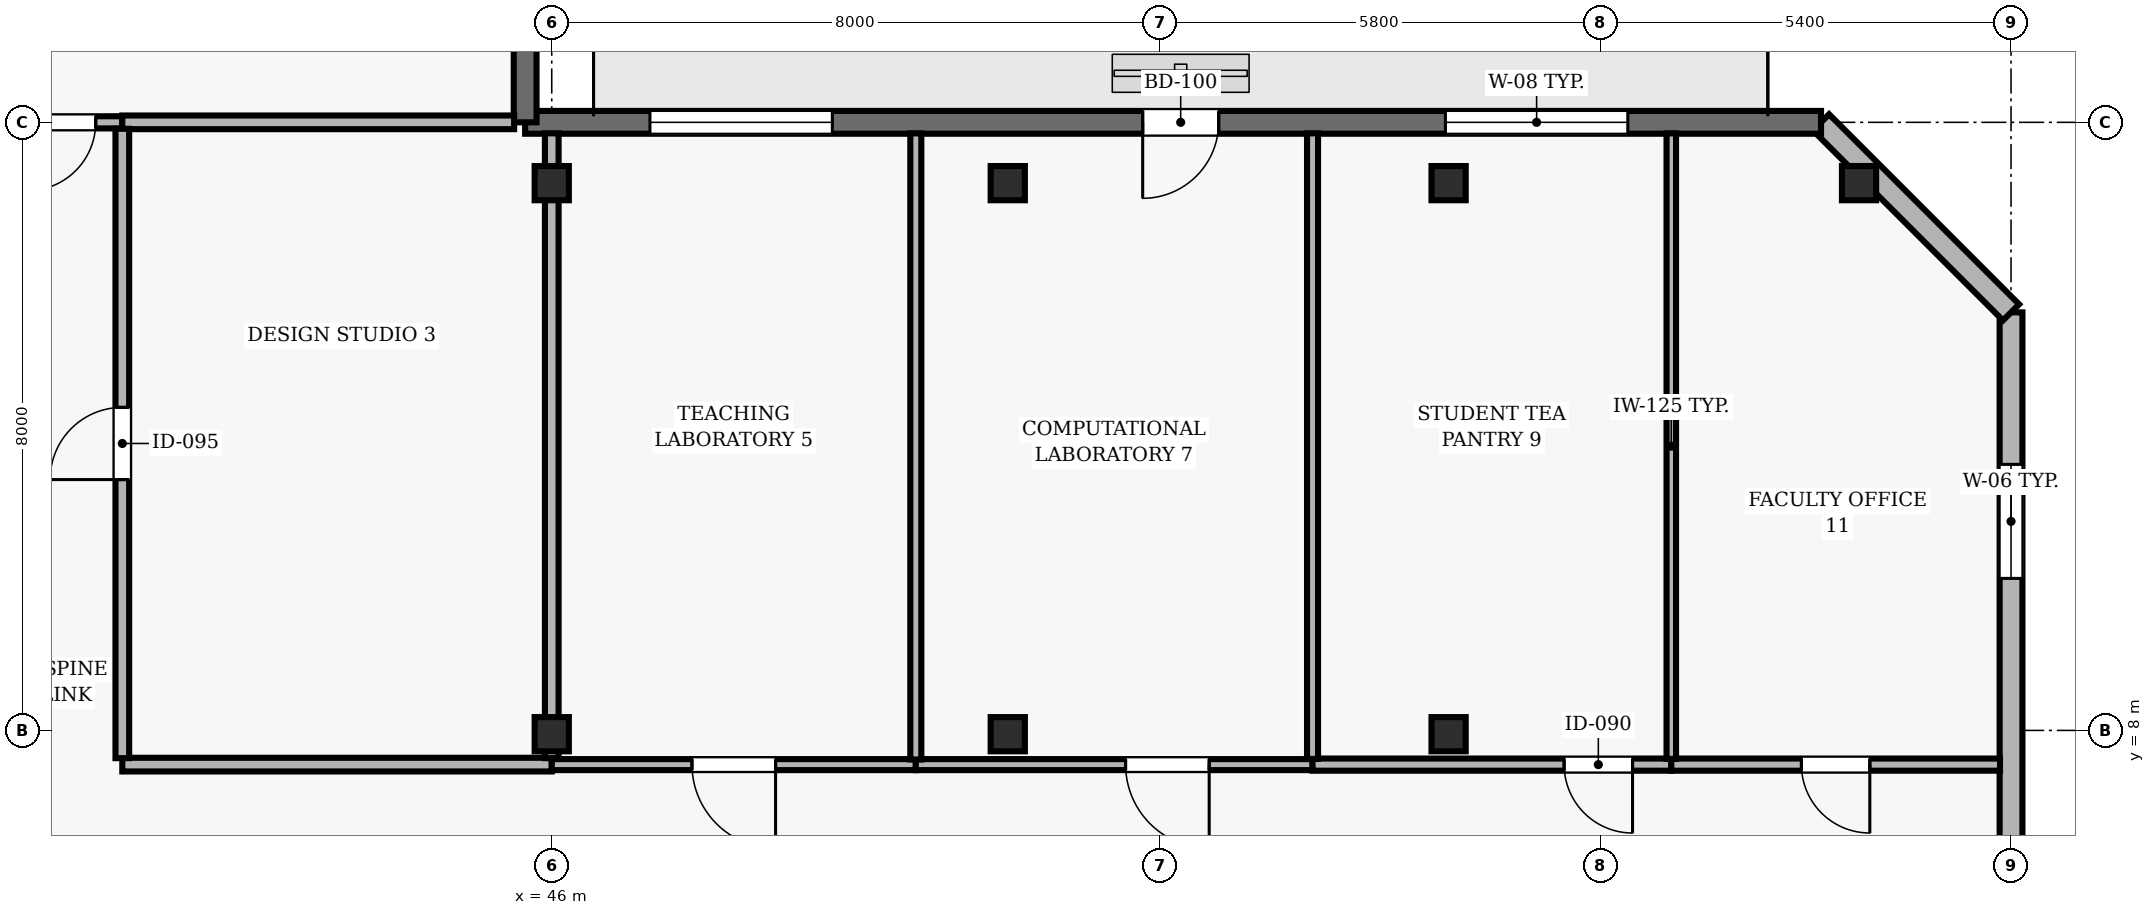
"""IFC4 building model, lengths in metres.
Left out: names, types, materials, properties, quantities, classifications, styles, units other than length and angle.
Written with IfcOpenShell. Run it as: python <this file> out.ifc"""

import sys

from ifc_helpers import new_model, si_unit, direction, frame, frame_2d, origin, origin_2d, place, context, subcontext, project, spatial, rectangle, hollow_rectangle, extrude, element, fill, save


model = new_model("IFC4")
c1 = context("Model", 3, precision=1e-05, world=origin(), true_north=direction((0.0, 1.0)))
c2 = subcontext(c1, "Body", "Model", "MODEL_VIEW")
j1 = project(units=[si_unit("LENGTHUNIT", "METRE"), si_unit("PLANEANGLEUNIT", "RADIAN")], contexts=[c1])
p1 = place(None, origin())
s1 = spatial("IfcSite", under=j1, at=p1, CompositionType="ELEMENT")
p2 = place(p1, origin())
s2 = spatial("IfcBuilding", under=s1, at=p2, CompositionType="ELEMENT")
p3 = place(p2, frame((0.0, 0.0, 210.9)))
s3 = spatial("IfcBuildingStorey", under=s2, at=p3, CompositionType="ELEMENT", Elevation=210.9)
for number, where, z_axis, x_axis in (
    (1, (46.0, 7.95, 0.0), (0.0, 0.0, 1.0), (1.0, 0.0, 0.0)),
    (2, (46.0, 15.2, 0.0), (0.0, 0.0, 1.0), (1.0, 0.0, 0.0)),
    (3, (52.0, 7.95, 0.0), (0.0, 0.0, 1.0), (1.0, 0.0, 0.0)),
    (4, (52.0, 15.2, 0.0), (0.0, 0.0, 1.0), (1.0, 0.0, 0.0)),
    (5, (57.8, 7.95, 0.0), (0.0, 0.0, 1.0), (1.0, 0.0, 0.0)),
    (6, (57.8, 15.2, 0.0), (0.0, 0.0, 1.0), (1.0, 0.0, 0.0)),
    (7, (63.2, 15.2, 0.0), (0.0, 0.0, 1.0), (1.0, 0.0, 0.0)),
):
    element("IfcColumn", number, at=place(p3, frame(where, z_axis=z_axis, x_axis=x_axis)), inside=s3, PredefinedType="COLUMN", context=c2, shape_type="SweptSolid", body=[
        extrude(hollow_rectangle(XDim=0.45, YDim=0.45, WallThickness=0.02, at=origin_2d()), origin(), (0.0, 0.0, 1.0), 3.9),
    ])
p4 = place(p3, frame((65.2, 2.5, 0.0), z_axis=(0.0, 0.0, 1.0), x_axis=(0.0, 1.0, 0.0)))
e8 = element("IfcWall", 8, at=p4, inside=s3, PredefinedType="SOLIDWALL", context=c2, shape_type="SweptSolid", body=[
    extrude(rectangle(XDim=11.0, YDim=0.3, at=frame_2d((5.5, 0.0))), origin(), (0.0, 0.0, 1.0), 3.69),
])
p5 = place(p4, frame((7.5, 0.0, 0.9)))
e9 = element("IfcOpeningElement", 9, at=p5, cuts=e8, PredefinedType="OPENING", context=c2, shape_type="SweptSolid", body=[
    extrude(rectangle(XDim=1.5, YDim=1.8, at=frame_2d((0.75, 0.9))), frame((0.0, 0.16, 0.0), z_axis=(0.0, -1.0, 0.0), x_axis=(1.0, 0.0, 0.0)), (0.0, 0.0, 1.0), 0.32),
])
p6 = place(p3, frame((65.2, 13.5, 0.0), z_axis=(0.0, 0.0, 1.0), x_axis=(-0.707106781187, 0.707106781187, 0.0)))
e10 = element("IfcWall", 10, at=p6, inside=s3, PredefinedType="SOLIDWALL", context=c2, shape_type="SweptSolid", body=[
    extrude(rectangle(XDim=3.536, YDim=0.3, at=frame_2d((1.768, 0.0))), origin(), (0.0, 0.0, 1.0), 3.69),
])
p7 = place(p3, frame((62.7, 16.0, 0.0), z_axis=(0.0, 0.0, 1.0), x_axis=(-1.0, 0.0, 0.0)))
e11 = element("IfcWall", 11, at=p7, inside=s3, PredefinedType="SOLIDWALL", context=c2, shape_type="SweptSolid", body=[
    extrude(rectangle(XDim=17.05, YDim=0.3, at=frame_2d((8.525, 0.0))), origin(), (0.0, 0.0, 1.0), 3.69),
])
p8 = place(p7, frame((7.925, 0.0, 0.0)))
e12 = element("IfcOpeningElement", 12, at=p8, cuts=e11, PredefinedType="OPENING", context=c2, shape_type="SweptSolid", body=[
    extrude(rectangle(XDim=1.0, YDim=2.2, at=frame_2d((0.5, 1.1))), frame((0.0, 0.16, 0.0), z_axis=(0.0, -1.0, 0.0), x_axis=(1.0, 0.0, 0.0)), (0.0, 0.0, 1.0), 0.32),
])
p9 = place(p7, frame((2.542, 0.0, 0.9)))
e13 = element("IfcOpeningElement", 13, at=p9, cuts=e11, PredefinedType="OPENING", context=c2, shape_type="SweptSolid", body=[
    extrude(rectangle(XDim=2.4, YDim=1.8, at=frame_2d((1.2, 0.9))), frame((0.0, 0.16, 0.0), z_axis=(0.0, -1.0, 0.0), x_axis=(1.0, 0.0, 0.0)), (0.0, 0.0, 1.0), 0.32),
])
p10 = place(p7, frame((13.008, 0.0, 0.9)))
e14 = element("IfcOpeningElement", 14, at=p10, cuts=e11, PredefinedType="OPENING", context=c2, shape_type="SweptSolid", body=[
    extrude(rectangle(XDim=2.4, YDim=1.8, at=frame_2d((1.2, 0.9))), frame((0.0, 0.16, 0.0), z_axis=(0.0, -1.0, 0.0), x_axis=(1.0, 0.0, 0.0)), (0.0, 0.0, 1.0), 0.32),
])
p11 = place(p3, frame((45.65, 16.0, 0.0), z_axis=(0.0, 0.0, 1.0), x_axis=(0.0, 1.0, 0.0)))
e15 = element("IfcWall", 15, at=p11, inside=s3, PredefinedType="SOLIDWALL", context=c2, shape_type="SweptSolid", body=[
    extrude(rectangle(XDim=5.483, YDim=0.3, at=frame_2d((2.741, 0.0))), origin(), (0.0, 0.0, 1.0), 3.69),
])
p12 = place(p11, frame((1.342, 0.0, 0.9)))
e16 = element("IfcOpeningElement", 16, at=p12, cuts=e15, PredefinedType="OPENING", context=c2, shape_type="SweptSolid", body=[
    extrude(rectangle(XDim=2.8, YDim=1.8, at=frame_2d((1.4, 0.9))), frame((0.0, 0.16, 0.0), z_axis=(0.0, -1.0, 0.0), x_axis=(1.0, 0.0, 0.0)), (0.0, 0.0, 1.0), 0.32),
])
p13 = place(p3, frame((40.35, 16.0, 0.0), z_axis=(0.0, 0.0, 1.0), x_axis=(-1.0, 0.0, 0.0)))
e17 = element("IfcWall", 17, at=p13, inside=s3, PredefinedType="PARTITIONING", context=c2, shape_type="SweptSolid", body=[
    extrude(rectangle(XDim=2.3, YDim=0.16, at=frame_2d((1.15, 0.0))), origin(), (0.0, 0.0, 1.0), 3.39),
])
p14 = place(p13, frame((0.35, 0.0, 0.0)))
e18 = element("IfcOpeningElement", 18, at=p14, cuts=e17, PredefinedType="OPENING", context=c2, shape_type="SweptSolid", body=[
    extrude(rectangle(XDim=0.9, YDim=2.1, at=frame_2d((0.45, 1.05))), frame((0.0, 0.09, 0.0), z_axis=(0.0, -1.0, 0.0), x_axis=(1.0, 0.0, 0.0)), (0.0, 0.0, 1.0), 0.18),
])
p15 = place(p3, frame((40.35, 16.0, 0.0), z_axis=(0.0, 0.0, 1.0), x_axis=(1.0, 0.0, 0.0)))
e19 = element("IfcWall", 19, at=p15, inside=s3, PredefinedType="PARTITIONING", context=c2, shape_type="SweptSolid", body=[
    extrude(rectangle(XDim=5.155, YDim=0.18, at=frame_2d((2.577, 0.0))), origin(), (0.0, 0.0, 1.0), 3.39),
])
p16 = place(p3, frame((46.0, 7.55, 0.0), z_axis=(0.0, 0.0, 1.0), x_axis=(-1.0, 0.0, 0.0)))
e20 = element("IfcWall", 20, at=p16, inside=s3, PredefinedType="PARTITIONING", context=c2, shape_type="SweptSolid", body=[
    extrude(rectangle(XDim=5.65, YDim=0.18, at=frame_2d((2.825, 0.0))), origin(), (0.0, 0.0, 1.0), 3.146),
])
p17 = place(p3, frame((50.79, 7.55, 0.0), z_axis=(0.0, 0.0, 1.0), x_axis=(-1.0, 0.0, 0.0)))
e21 = element("IfcWall", 21, at=p17, inside=s3, PredefinedType="PARTITIONING", context=c2, shape_type="SweptSolid", body=[
    extrude(rectangle(XDim=4.79, YDim=0.145, at=frame_2d((2.395, 0.0))), origin(), (0.0, 0.0, 1.0), 3.146),
])
p18 = place(p17, frame((1.845, 0.0, 0.0)))
e22 = element("IfcOpeningElement", 22, at=p18, cuts=e21, PredefinedType="OPENING", context=c2, shape_type="SweptSolid", body=[
    extrude(rectangle(XDim=1.1, YDim=2.15, at=frame_2d((0.55, 1.075))), frame((0.0, 0.083, 0.0), z_axis=(0.0, -1.0, 0.0), x_axis=(1.0, 0.0, 0.0)), (0.0, 0.0, 1.0), 0.165),
])
p19 = place(p3, frame((56.01, 7.55, 0.0), z_axis=(0.0, 0.0, 1.0), x_axis=(-1.0, 0.0, 0.0)))
e23 = element("IfcWall", 23, at=p19, inside=s3, PredefinedType="PARTITIONING", context=c2, shape_type="SweptSolid", body=[
    extrude(rectangle(XDim=5.22, YDim=0.145, at=frame_2d((2.61, 0.0))), origin(), (0.0, 0.0, 1.0), 3.146),
])
p20 = place(p19, frame((1.36, 0.0, 0.0)))
e24 = element("IfcOpeningElement", 24, at=p20, cuts=e23, PredefinedType="OPENING", context=c2, shape_type="SweptSolid", body=[
    extrude(rectangle(XDim=1.1, YDim=2.15, at=frame_2d((0.55, 1.075))), frame((0.0, 0.083, 0.0), z_axis=(0.0, -1.0, 0.0), x_axis=(1.0, 0.0, 0.0)), (0.0, 0.0, 1.0), 0.165),
])
p21 = place(p3, frame((60.73, 7.55, 0.0), z_axis=(0.0, 0.0, 1.0), x_axis=(-1.0, 0.0, 0.0)))
e25 = element("IfcWall", 25, at=p21, inside=s3, PredefinedType="PARTITIONING", context=c2, shape_type="SweptSolid", body=[
    extrude(rectangle(XDim=4.72, YDim=0.16, at=frame_2d((2.36, 0.0))), origin(), (0.0, 0.0, 1.0), 3.146),
])
p22 = place(p21, frame((0.51, 0.0, 0.0)))
e26 = element("IfcOpeningElement", 26, at=p22, cuts=e25, PredefinedType="OPENING", context=c2, shape_type="SweptSolid", body=[
    extrude(rectangle(XDim=0.9, YDim=2.1, at=frame_2d((0.45, 1.05))), frame((0.0, 0.09, 0.0), z_axis=(0.0, -1.0, 0.0), x_axis=(1.0, 0.0, 0.0)), (0.0, 0.0, 1.0), 0.18),
])
p23 = place(p3, frame((65.055, 7.55, 0.0), z_axis=(0.0, 0.0, 1.0), x_axis=(-1.0, 0.0, 0.0)))
e27 = element("IfcWall", 27, at=p23, inside=s3, PredefinedType="PARTITIONING", context=c2, shape_type="SweptSolid", body=[
    extrude(rectangle(XDim=4.325, YDim=0.16, at=frame_2d((2.163, 0.0))), origin(), (0.0, 0.0, 1.0), 3.69),
])
p24 = place(p23, frame((1.713, 0.0, 0.0)))
e28 = element("IfcOpeningElement", 28, at=p24, cuts=e27, PredefinedType="OPENING", context=c2, shape_type="SweptSolid", body=[
    extrude(rectangle(XDim=0.9, YDim=2.1, at=frame_2d((0.45, 1.05))), frame((0.0, 0.09, 0.0), z_axis=(0.0, -1.0, 0.0), x_axis=(1.0, 0.0, 0.0)), (0.0, 0.0, 1.0), 0.18),
])
p25 = place(p3, frame((40.35, 7.635, 0.0), z_axis=(0.0, 0.0, 1.0), x_axis=(0.0, 1.0, 0.0)))
e29 = element("IfcWall", 29, at=p25, inside=s3, PredefinedType="PARTITIONING", context=c2, shape_type="SweptSolid", body=[
    extrude(rectangle(XDim=8.28, YDim=0.18, at=frame_2d((4.14, 0.0))), origin(), (0.0, 0.0, 1.0), 3.372),
])
p26 = place(p25, frame((3.665, 0.0, 0.0)))
e30 = element("IfcOpeningElement", 30, at=p26, cuts=e29, PredefinedType="OPENING", context=c2, shape_type="SweptSolid", body=[
    extrude(rectangle(XDim=0.95, YDim=2.1, at=frame_2d((0.475, 1.05))), frame((0.0, 0.1, 0.0), z_axis=(0.0, -1.0, 0.0), x_axis=(1.0, 0.0, 0.0)), (0.0, 0.0, 1.0), 0.2),
])
p27 = place(p3, frame((46.0, 7.635, 0.0), z_axis=(0.0, 0.0, 1.0), x_axis=(0.0, 1.0, 0.0)))
e31 = element("IfcWall", 31, at=p27, inside=s3, PredefinedType="PARTITIONING", context=c2, shape_type="SweptSolid", body=[
    extrude(rectangle(XDim=8.22, YDim=0.18, at=frame_2d((4.11, 0.0))), origin(), (0.0, 0.0, 1.0), 3.146),
])
p28 = place(p3, frame((50.79, 7.617, 0.0), z_axis=(0.0, 0.0, 1.0), x_axis=(0.0, 1.0, 0.0)))
e32 = element("IfcWall", 32, at=p28, inside=s3, PredefinedType="PARTITIONING", context=c2, shape_type="SweptSolid", body=[
    extrude(rectangle(XDim=8.238, YDim=0.145, at=frame_2d((4.119, 0.0))), origin(), (0.0, 0.0, 1.0), 3.69),
])
p29 = place(p3, frame((56.01, 7.625, 0.0), z_axis=(0.0, 0.0, 1.0), x_axis=(0.0, 1.0, 0.0)))
e33 = element("IfcWall", 33, at=p29, inside=s3, PredefinedType="PARTITIONING", context=c2, shape_type="SweptSolid", body=[
    extrude(rectangle(XDim=8.23, YDim=0.145, at=frame_2d((4.115, 0.0))), origin(), (0.0, 0.0, 1.0), 3.69),
])
p30 = place(p3, frame((60.73, 7.625, 0.0), z_axis=(0.0, 0.0, 1.0), x_axis=(0.0, 1.0, 0.0)))
e34 = element("IfcWall", 34, at=p30, inside=s3, PredefinedType="PARTITIONING", context=c2, shape_type="SweptSolid", body=[
    extrude(rectangle(XDim=8.23, YDim=0.125, at=frame_2d((4.115, 0.0))), origin(), (0.0, 0.0, 1.0), 3.69),
])
p31 = place(p5, origin())
e35 = element("IfcWindow", 35, at=p31, inside=s3, PartitioningType="SINGLE_PANEL", PredefinedType="WINDOW", context=c2, shape_type="SweptSolid", body=[
    extrude(rectangle(XDim=1.5, YDim=1.8, at=frame_2d((0.75, 0.9))), frame((0.0, 0.03, 0.0), z_axis=(0.0, -1.0, 0.0), x_axis=(1.0, 0.0, 0.0)), (0.0, 0.0, 1.0), 0.06),
])
fill(e9, e35)
p32 = place(p8, origin())
e36 = element("IfcDoor", 36, at=p32, inside=s3, OperationType="SINGLE_SWING_RIGHT", PredefinedType="DOOR", context=c2, shape_type="SweptSolid", body=[
    extrude(rectangle(XDim=1.0, YDim=2.2, at=frame_2d((0.5, 1.1))), frame((0.0, 0.025, 0.0), z_axis=(0.0, -1.0, 0.0), x_axis=(1.0, 0.0, 0.0)), (0.0, 0.0, 1.0), 0.05),
])
fill(e12, e36)
p33 = place(p9, origin())
e37 = element("IfcWindow", 37, at=p33, inside=s3, PartitioningType="SINGLE_PANEL", PredefinedType="WINDOW", context=c2, shape_type="SweptSolid", body=[
    extrude(rectangle(XDim=2.4, YDim=1.8, at=frame_2d((1.2, 0.9))), frame((0.0, 0.03, 0.0), z_axis=(0.0, -1.0, 0.0), x_axis=(1.0, 0.0, 0.0)), (0.0, 0.0, 1.0), 0.06),
])
fill(e13, e37)
p34 = place(p10, origin())
e38 = element("IfcWindow", 38, at=p34, inside=s3, PartitioningType="SINGLE_PANEL", PredefinedType="WINDOW", context=c2, shape_type="SweptSolid", body=[
    extrude(rectangle(XDim=2.4, YDim=1.8, at=frame_2d((1.2, 0.9))), frame((0.0, 0.03, 0.0), z_axis=(0.0, -1.0, 0.0), x_axis=(1.0, 0.0, 0.0)), (0.0, 0.0, 1.0), 0.06),
])
fill(e14, e38)
p35 = place(p26, origin())
e39 = element("IfcDoor", 39, at=p35, inside=s3, OperationType="SINGLE_SWING_LEFT", PredefinedType="DOOR", context=c2, shape_type="SweptSolid", body=[
    extrude(rectangle(XDim=0.95, YDim=2.1, at=frame_2d((0.475, 1.05))), frame((0.0, 0.025, 0.0), z_axis=(0.0, -1.0, 0.0), x_axis=(1.0, 0.0, 0.0)), (0.0, 0.0, 1.0), 0.05),
])
fill(e30, e39)
p36 = place(p18, origin())
e40 = element("IfcDoor", 40, at=p36, inside=s3, OperationType="SINGLE_SWING_LEFT", PredefinedType="DOOR", context=c2, shape_type="SweptSolid", body=[
    extrude(rectangle(XDim=1.1, YDim=2.15, at=frame_2d((0.55, 1.075))), frame((0.0, 0.025, 0.0), z_axis=(0.0, -1.0, 0.0), x_axis=(1.0, 0.0, 0.0)), (0.0, 0.0, 1.0), 0.05),
])
fill(e22, e40)
p37 = place(p20, origin())
e41 = element("IfcDoor", 41, at=p37, inside=s3, OperationType="SINGLE_SWING_LEFT", PredefinedType="DOOR", context=c2, shape_type="SweptSolid", body=[
    extrude(rectangle(XDim=1.1, YDim=2.15, at=frame_2d((0.55, 1.075))), frame((0.0, 0.025, 0.0), z_axis=(0.0, -1.0, 0.0), x_axis=(1.0, 0.0, 0.0)), (0.0, 0.0, 1.0), 0.05),
])
fill(e24, e41)
p38 = place(p22, origin())
e42 = element("IfcDoor", 42, at=p38, inside=s3, OperationType="SINGLE_SWING_LEFT", PredefinedType="DOOR", context=c2, shape_type="SweptSolid", body=[
    extrude(rectangle(XDim=0.9, YDim=2.1, at=frame_2d((0.45, 1.05))), frame((0.0, 0.025, 0.0), z_axis=(0.0, -1.0, 0.0), x_axis=(1.0, 0.0, 0.0)), (0.0, 0.0, 1.0), 0.05),
])
fill(e26, e42)
p39 = place(p24, origin())
e43 = element("IfcDoor", 43, at=p39, inside=s3, OperationType="SINGLE_SWING_LEFT", PredefinedType="DOOR", context=c2, shape_type="SweptSolid", body=[
    extrude(rectangle(XDim=0.9, YDim=2.1, at=frame_2d((0.45, 1.05))), frame((0.0, 0.025, 0.0), z_axis=(0.0, -1.0, 0.0), x_axis=(1.0, 0.0, 0.0)), (0.0, 0.0, 1.0), 0.05),
])
fill(e28, e43)
p40 = place(p14, origin())
e44 = element("IfcDoor", 44, at=p40, inside=s3, OperationType="SINGLE_SWING_RIGHT", PredefinedType="DOOR", context=c2, shape_type="SweptSolid", body=[
    extrude(rectangle(XDim=0.9, YDim=2.1, at=frame_2d((0.45, 1.05))), frame((0.0, 0.025, 0.0), z_axis=(0.0, -1.0, 0.0), x_axis=(1.0, 0.0, 0.0)), (0.0, 0.0, 1.0), 0.05),
])
fill(e18, e44)
save(model, sys.argv[1])
